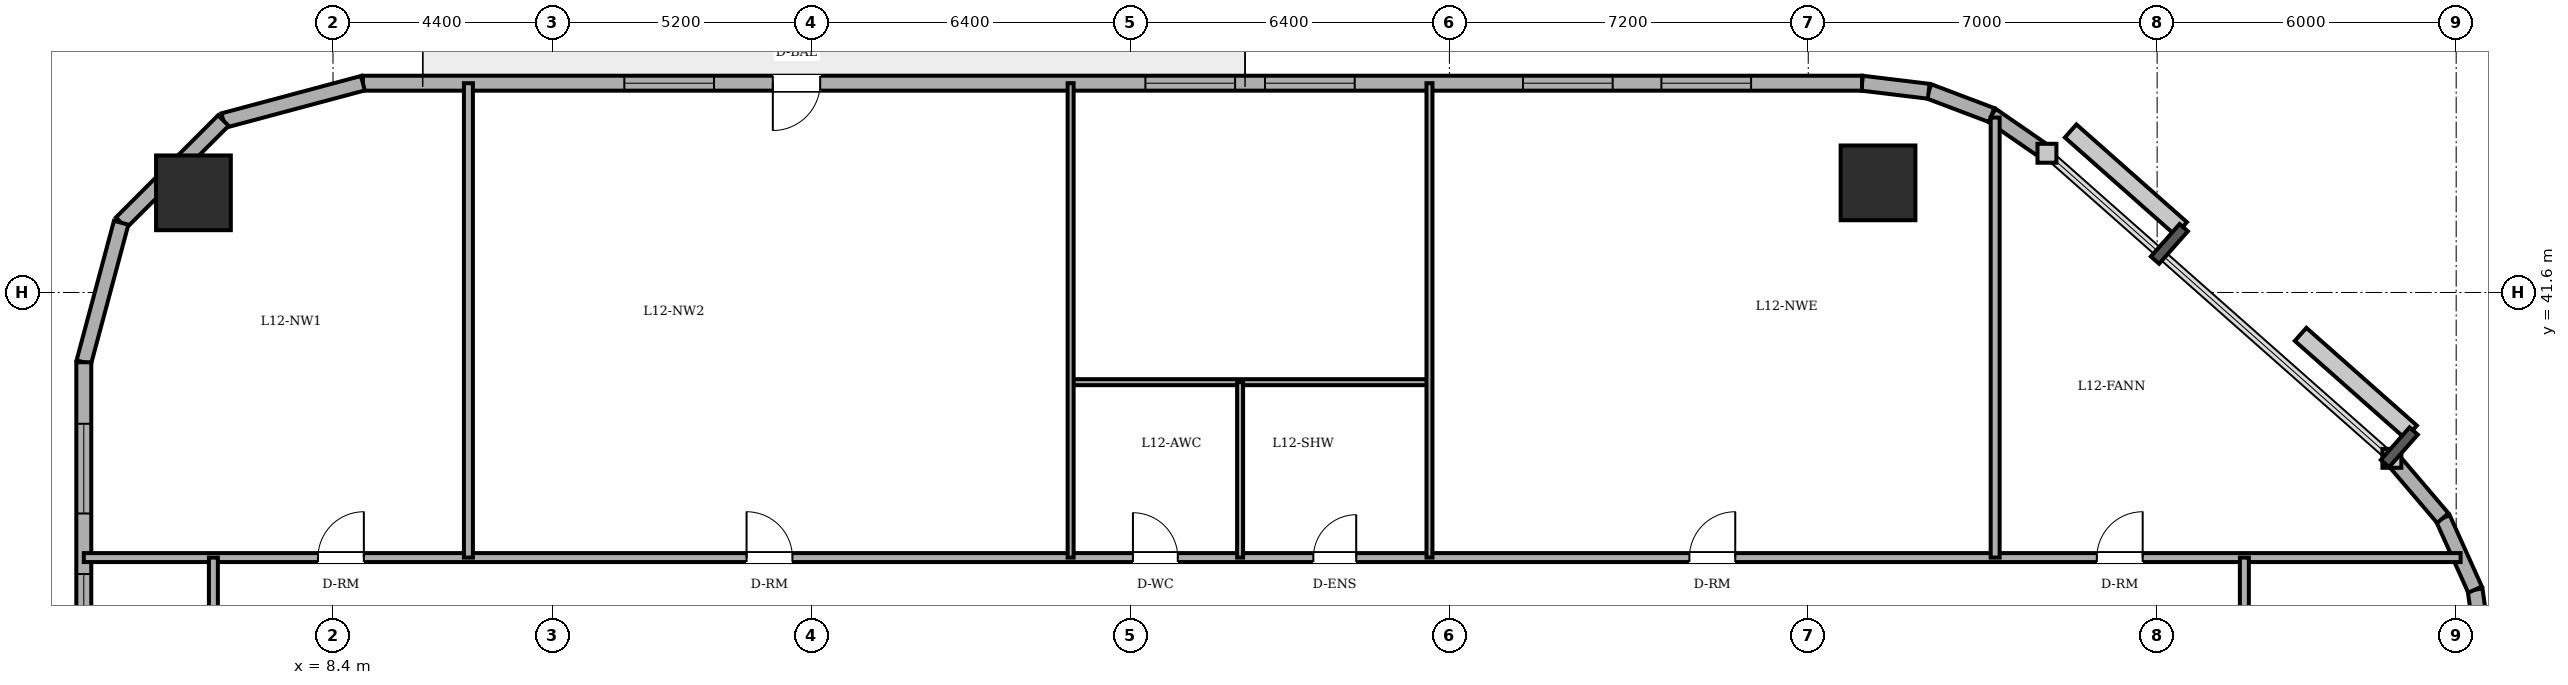
"""IFC4 building model, lengths in metres.
Left out: names, types, materials, properties, quantities, classifications, styles, units other than length and angle.
Written with IfcOpenShell. Run it as: python <this file> out.ifc"""

import sys

from ifc_helpers import new_model, si_unit, direction, frame, frame_2d, origin, origin_2d, place, context, subcontext, project, spatial, rectangle, circle, extrude, element, fill, save


model = new_model("IFC4")
c1 = context("Model", 3, precision=1e-05, world=origin(), true_north=direction((0.0, 1.0)))
c2 = subcontext(c1, "Body", "Model", "MODEL_VIEW")
j1 = project(units=[si_unit("LENGTHUNIT", "METRE"), si_unit("PLANEANGLEUNIT", "RADIAN")], contexts=[c1])
p1 = place(None, origin())
s1 = spatial("IfcSite", under=j1, at=p1, CompositionType="ELEMENT")
p2 = place(p1, origin())
s2 = spatial("IfcBuilding", under=s1, at=p2, CompositionType="ELEMENT")
p3 = place(p2, frame((0.0, 0.0, 46.8)))
s3 = spatial("IfcBuildingStorey", under=s2, at=p3, CompositionType="ELEMENT", Elevation=46.8)
for number, where, z_axis, x_axis in (
    (1, (39.4, 43.8, 0.0), (0.0, 0.0, 1.0), (1.0, 0.0, 0.0)),
    (2, (5.6, 43.6, 0.0), (0.0, 0.0, 1.0), (1.0, 0.0, 0.0)),
):
    element("IfcColumn", number, at=place(p3, frame(where, z_axis=z_axis, x_axis=x_axis)), inside=s3, PredefinedType="COLUMN", context=c2, shape_type="SweptSolid", body=[
        extrude(circle(Radius=0.75, at=origin_2d()), origin(), (0.0, 0.0, 1.0), 3.6),
    ])
p4 = place(p3, frame((51.6, 34.077, 0.0), z_axis=(0.0, 0.0, 1.0), x_axis=(-0.140380048512, 0.990097693149, 0.0)))
e3 = element("IfcWall", 3, at=p4, inside=s3, PredefinedType="SOLIDWALL", context=c2, shape_type="SweptSolid", body=[
    extrude(rectangle(XDim=1.576, YDim=0.3, at=frame_2d((0.788, 0.0))), origin(), (0.0, 0.0, 1.0), 3.4),
])
p5 = place(p3, frame((51.379, 35.637, 0.0), z_axis=(0.0, 0.0, 1.0), x_axis=(-0.410996558744, 0.911636895206, 0.0)))
e4 = element("IfcWall", 4, at=p5, inside=s3, PredefinedType="SOLIDWALL", context=c2, shape_type="SweptSolid", body=[
    extrude(rectangle(XDim=1.574, YDim=0.3, at=frame_2d((0.787, 0.0))), origin(), (0.0, 0.0, 1.0), 3.4),
])
p6 = place(p3, frame((50.732, 37.072, 0.0), z_axis=(0.0, 0.0, 1.0), x_axis=(-0.648389989909, 0.7613083613, 0.0)))
e5 = element("IfcWall", 5, at=p6, inside=s3, PredefinedType="SOLIDWALL", context=c2, shape_type="SweptSolid", body=[
    extrude(rectangle(XDim=1.576, YDim=0.3, at=frame_2d((0.788, 0.0))), origin(), (0.0, 0.0, 1.0), 3.4),
])
p7 = place(p3, frame((42.789, 44.394, 0.0), z_axis=(0.0, 0.0, 1.0), x_axis=(-0.823116500192, 0.567872544777, 0.0)))
e6 = element("IfcWall", 6, at=p7, inside=s3, PredefinedType="SOLIDWALL", context=c2, shape_type="SweptSolid", body=[
    extrude(rectangle(XDim=1.349, YDim=0.3, at=frame_2d((0.674, 0.0))), origin(), (0.0, 0.0, 1.0), 3.4),
])
p8 = place(p3, frame((41.679, 45.16, 0.0), z_axis=(0.0, 0.0, 1.0), x_axis=(-0.935156721165, 0.354234254216, 0.0)))
e7 = element("IfcWall", 7, at=p8, inside=s3, PredefinedType="SOLIDWALL", context=c2, shape_type="SweptSolid", body=[
    extrude(rectangle(XDim=1.349, YDim=0.3, at=frame_2d((0.675, 0.0))), origin(), (0.0, 0.0, 1.0), 3.4),
])
p9 = place(p3, frame((40.417, 45.638, 0.0), z_axis=(0.0, 0.0, 1.0), x_axis=(-0.992739027259, 0.120288086515, 0.0)))
e8 = element("IfcWall", 8, at=p9, inside=s3, PredefinedType="SOLIDWALL", context=c2, shape_type="SweptSolid", body=[
    extrude(rectangle(XDim=1.348, YDim=0.3, at=frame_2d((0.674, 0.0))), origin(), (0.0, 0.0, 1.0), 3.4),
])
p10 = place(p3, frame((39.079, 45.8, 0.0), z_axis=(0.0, 0.0, 1.0), x_axis=(-1.0, 0.0, 0.0)))
e9 = element("IfcWall", 9, at=p10, inside=s3, PredefinedType="SOLIDWALL", context=c2, shape_type="SweptSolid", body=[
    extrude(rectangle(XDim=30.079, YDim=0.3, at=frame_2d((15.04, 0.0))), origin(), (0.0, 0.0, 1.0), 3.4),
])
p11 = place(p10, frame((20.904, 0.0, 0.0)))
e10 = element("IfcOpeningElement", 10, at=p11, cuts=e9, PredefinedType="OPENING", context=c2, shape_type="SweptSolid", body=[
    extrude(rectangle(XDim=0.95, YDim=2.2, at=frame_2d((0.475, 1.1))), frame((0.0, 0.16, 0.0), z_axis=(0.0, -1.0, 0.0), x_axis=(1.0, 0.0, 0.0)), (0.0, 0.0, 1.0), 0.32),
])
p12 = place(p10, frame((2.226, 0.0, 0.85)))
e11 = element("IfcOpeningElement", 11, at=p12, cuts=e9, PredefinedType="OPENING", context=c2, shape_type="SweptSolid", body=[
    extrude(rectangle(XDim=1.8, YDim=1.55, at=frame_2d((0.9, 0.775))), frame((0.0, 0.16, 0.0), z_axis=(0.0, -1.0, 0.0), x_axis=(1.0, 0.0, 0.0)), (0.0, 0.0, 1.0), 0.32),
])
p13 = place(p10, frame((5.003, 0.0, 0.85)))
e12 = element("IfcOpeningElement", 12, at=p13, cuts=e9, PredefinedType="OPENING", context=c2, shape_type="SweptSolid", body=[
    extrude(rectangle(XDim=1.8, YDim=1.55, at=frame_2d((0.9, 0.775))), frame((0.0, 0.16, 0.0), z_axis=(0.0, -1.0, 0.0), x_axis=(1.0, 0.0, 0.0)), (0.0, 0.0, 1.0), 0.32),
])
p14 = place(p10, frame((10.179, 0.0, 0.85)))
e13 = element("IfcOpeningElement", 13, at=p14, cuts=e9, PredefinedType="OPENING", context=c2, shape_type="SweptSolid", body=[
    extrude(rectangle(XDim=1.8, YDim=1.55, at=frame_2d((0.9, 0.775))), frame((0.0, 0.16, 0.0), z_axis=(0.0, -1.0, 0.0), x_axis=(1.0, 0.0, 0.0)), (0.0, 0.0, 1.0), 0.32),
])
p15 = place(p10, frame((12.579, 0.0, 0.85)))
e14 = element("IfcOpeningElement", 14, at=p15, cuts=e9, PredefinedType="OPENING", context=c2, shape_type="SweptSolid", body=[
    extrude(rectangle(XDim=1.8, YDim=1.55, at=frame_2d((0.9, 0.775))), frame((0.0, 0.16, 0.0), z_axis=(0.0, -1.0, 0.0), x_axis=(1.0, 0.0, 0.0)), (0.0, 0.0, 1.0), 0.32),
])
p16 = place(p10, frame((23.034, 0.0, 0.85)))
e15 = element("IfcOpeningElement", 15, at=p16, cuts=e9, PredefinedType="OPENING", context=c2, shape_type="SweptSolid", body=[
    extrude(rectangle(XDim=1.8, YDim=1.55, at=frame_2d((0.9, 0.775))), frame((0.0, 0.16, 0.0), z_axis=(0.0, -1.0, 0.0), x_axis=(1.0, 0.0, 0.0)), (0.0, 0.0, 1.0), 0.32),
])
p17 = place(p3, frame((9.0, 45.8, 0.0), z_axis=(0.0, 0.0, 1.0), x_axis=(-0.96594917914, -0.258731875344, 0.0)))
e16 = element("IfcWall", 16, at=p17, inside=s3, PredefinedType="SOLIDWALL", context=c2, shape_type="SweptSolid", body=[
    extrude(rectangle(XDim=2.899, YDim=0.3, at=frame_2d((1.449, 0.0))), origin(), (0.0, 0.0, 1.0), 3.4),
])
p18 = place(p3, frame((6.2, 45.05, 0.0), z_axis=(0.0, 0.0, 1.0), x_axis=(-0.707106781187, -0.707106781187, 0.0)))
e17 = element("IfcWall", 17, at=p18, inside=s3, PredefinedType="SOLIDWALL", context=c2, shape_type="SweptSolid", body=[
    extrude(rectangle(XDim=2.899, YDim=0.3, at=frame_2d((1.45, 0.0))), origin(), (0.0, 0.0, 1.0), 3.4),
])
p19 = place(p3, frame((4.15, 43.0, 0.0), z_axis=(0.0, 0.0, 1.0), x_axis=(-0.258731875344, -0.96594917914, 0.0)))
e18 = element("IfcWall", 18, at=p19, inside=s3, PredefinedType="SOLIDWALL", context=c2, shape_type="SweptSolid", body=[
    extrude(rectangle(XDim=2.899, YDim=0.3, at=frame_2d((1.449, 0.0))), origin(), (0.0, 0.0, 1.0), 3.4),
])
p20 = place(p3, frame((3.4, 40.2, 0.0), z_axis=(0.0, 0.0, 1.0), x_axis=(0.0, -1.0, 0.0)))
e19 = element("IfcWall", 19, at=p20, inside=s3, PredefinedType="SOLIDWALL", context=c2, shape_type="SweptSolid", body=[
    extrude(rectangle(XDim=32.4, YDim=0.3, at=frame_2d((16.2, 0.0))), origin(), (0.0, 0.0, 1.0), 3.4),
])
p21 = place(p20, frame((1.235, 0.0, 0.85)))
e20 = element("IfcOpeningElement", 20, at=p21, cuts=e19, PredefinedType="OPENING", context=c2, shape_type="SweptSolid", body=[
    extrude(rectangle(XDim=1.8, YDim=1.55, at=frame_2d((0.9, 0.775))), frame((0.0, 0.16, 0.0), z_axis=(0.0, -1.0, 0.0), x_axis=(1.0, 0.0, 0.0)), (0.0, 0.0, 1.0), 0.32),
])
p22 = place(p20, frame((4.25, 0.0, 0.85)))
e21 = element("IfcOpeningElement", 21, at=p22, cuts=e19, PredefinedType="OPENING", context=c2, shape_type="SweptSolid", body=[
    extrude(rectangle(XDim=1.8, YDim=1.55, at=frame_2d((0.9, 0.775))), frame((0.0, 0.16, 0.0), z_axis=(0.0, -1.0, 0.0), x_axis=(1.0, 0.0, 0.0)), (0.0, 0.0, 1.0), 0.32),
])
p23 = place(p20, frame((9.253, 0.0, 0.85)))
e22 = element("IfcOpeningElement", 22, at=p23, cuts=e19, PredefinedType="OPENING", context=c2, shape_type="SweptSolid", body=[
    extrude(rectangle(XDim=1.8, YDim=1.55, at=frame_2d((0.9, 0.775))), frame((0.0, 0.16, 0.0), z_axis=(0.0, -1.0, 0.0), x_axis=(1.0, 0.0, 0.0)), (0.0, 0.0, 1.0), 0.32),
])
p24 = place(p20, frame((13.027, 0.0, 0.85)))
e23 = element("IfcOpeningElement", 23, at=p24, cuts=e19, PredefinedType="OPENING", context=c2, shape_type="SweptSolid", body=[
    extrude(rectangle(XDim=1.8, YDim=1.55, at=frame_2d((0.9, 0.775))), frame((0.0, 0.16, 0.0), z_axis=(0.0, -1.0, 0.0), x_axis=(1.0, 0.0, 0.0)), (0.0, 0.0, 1.0), 0.32),
])
p25 = place(p20, frame((19.573, 0.0, 0.85)))
e24 = element("IfcOpeningElement", 24, at=p25, cuts=e19, PredefinedType="OPENING", context=c2, shape_type="SweptSolid", body=[
    extrude(rectangle(XDim=1.8, YDim=1.55, at=frame_2d((0.9, 0.775))), frame((0.0, 0.16, 0.0), z_axis=(0.0, -1.0, 0.0), x_axis=(1.0, 0.0, 0.0)), (0.0, 0.0, 1.0), 0.32),
])
p26 = place(p20, frame((22.347, 0.0, 0.85)))
e25 = element("IfcOpeningElement", 25, at=p26, cuts=e19, PredefinedType="OPENING", context=c2, shape_type="SweptSolid", body=[
    extrude(rectangle(XDim=1.8, YDim=1.55, at=frame_2d((0.9, 0.775))), frame((0.0, 0.16, 0.0), z_axis=(0.0, -1.0, 0.0), x_axis=(1.0, 0.0, 0.0)), (0.0, 0.0, 1.0), 0.32),
])
p27 = place(p20, frame((26.35, 0.0, 0.85)))
e26 = element("IfcOpeningElement", 26, at=p27, cuts=e19, PredefinedType="OPENING", context=c2, shape_type="SweptSolid", body=[
    extrude(rectangle(XDim=1.8, YDim=1.55, at=frame_2d((0.9, 0.775))), frame((0.0, 0.16, 0.0), z_axis=(0.0, -1.0, 0.0), x_axis=(1.0, 0.0, 0.0)), (0.0, 0.0, 1.0), 0.32),
])
p28 = place(p20, frame((29.365, 0.0, 0.85)))
e27 = element("IfcOpeningElement", 27, at=p28, cuts=e19, PredefinedType="OPENING", context=c2, shape_type="SweptSolid", body=[
    extrude(rectangle(XDim=1.8, YDim=1.55, at=frame_2d((0.9, 0.775))), frame((0.0, 0.16, 0.0), z_axis=(0.0, -1.0, 0.0), x_axis=(1.0, 0.0, 0.0)), (0.0, 0.0, 1.0), 0.32),
])
p29 = place(p3, frame((3.4, 36.28, 0.0), z_axis=(0.0, 0.0, 1.0), x_axis=(1.0, 0.0, 0.0)))
e28 = element("IfcWall", 28, at=p29, inside=s3, PredefinedType="PARTITIONING", context=c2, shape_type="SweptSolid", body=[
    extrude(rectangle(XDim=47.689, YDim=0.18, at=frame_2d((23.845, 0.0))), origin(), (0.0, 0.0, 1.0), 3.4),
])
p30 = place(p29, frame((21.05, 0.0, 0.0)))
e29 = element("IfcOpeningElement", 29, at=p30, cuts=e28, PredefinedType="OPENING", context=c2, shape_type="SweptSolid", body=[
    extrude(rectangle(XDim=0.9, YDim=2.1, at=frame_2d((0.45, 1.05))), frame((0.0, 0.1, 0.0), z_axis=(0.0, -1.0, 0.0), x_axis=(1.0, 0.0, 0.0)), (0.0, 0.0, 1.0), 0.2),
])
p31 = place(p29, frame((24.67, 0.0, 0.0)))
e30 = element("IfcOpeningElement", 30, at=p31, cuts=e28, PredefinedType="OPENING", context=c2, shape_type="SweptSolid", body=[
    extrude(rectangle(XDim=0.86, YDim=2.1, at=frame_2d((0.43, 1.05))), frame((0.0, 0.1, 0.0), z_axis=(0.0, -1.0, 0.0), x_axis=(1.0, 0.0, 0.0)), (0.0, 0.0, 1.0), 0.2),
])
p32 = place(p29, frame((40.39, 0.0, 0.0)))
e31 = element("IfcOpeningElement", 31, at=p32, cuts=e28, PredefinedType="OPENING", context=c2, shape_type="SweptSolid", body=[
    extrude(rectangle(XDim=0.92, YDim=2.1, at=frame_2d((0.46, 1.05))), frame((0.0, 0.1, 0.0), z_axis=(0.0, -1.0, 0.0), x_axis=(1.0, 0.0, 0.0)), (0.0, 0.0, 1.0), 0.2),
])
p33 = place(p29, frame((4.699, 0.0, 0.0)))
e32 = element("IfcOpeningElement", 32, at=p33, cuts=e28, PredefinedType="OPENING", context=c2, shape_type="SweptSolid", body=[
    extrude(rectangle(XDim=0.92, YDim=2.1, at=frame_2d((0.46, 1.05))), frame((0.0, 0.1, 0.0), z_axis=(0.0, -1.0, 0.0), x_axis=(1.0, 0.0, 0.0)), (0.0, 0.0, 1.0), 0.2),
])
p34 = place(p29, frame((13.298, 0.0, 0.0)))
e33 = element("IfcOpeningElement", 33, at=p34, cuts=e28, PredefinedType="OPENING", context=c2, shape_type="SweptSolid", body=[
    extrude(rectangle(XDim=0.92, YDim=2.1, at=frame_2d((0.46, 1.05))), frame((0.0, 0.1, 0.0), z_axis=(0.0, -1.0, 0.0), x_axis=(1.0, 0.0, 0.0)), (0.0, 0.0, 1.0), 0.2),
])
p35 = place(p29, frame((32.215, 0.0, 0.0)))
e34 = element("IfcOpeningElement", 34, at=p35, cuts=e28, PredefinedType="OPENING", context=c2, shape_type="SweptSolid", body=[
    extrude(rectangle(XDim=0.92, YDim=2.1, at=frame_2d((0.46, 1.05))), frame((0.0, 0.1, 0.0), z_axis=(0.0, -1.0, 0.0), x_axis=(1.0, 0.0, 0.0)), (0.0, 0.0, 1.0), 0.2),
])
p36 = place(p3, frame((23.2, 39.8, 0.0), z_axis=(0.0, 0.0, 1.0), x_axis=(1.0, 0.0, 0.0)))
e35 = element("IfcWall", 35, at=p36, inside=s3, PredefinedType="PARTITIONING", context=c2, shape_type="SweptSolid", body=[
    extrude(rectangle(XDim=7.2, YDim=0.12, at=frame_2d((3.6, 0.0))), origin(), (0.0, 0.0, 1.0), 3.4),
])
p37 = place(p3, frame((6.0, 33.82, 0.0), z_axis=(0.0, 0.0, 1.0), x_axis=(0.0, 1.0, 0.0)))
e36 = element("IfcWall", 36, at=p37, inside=s3, PredefinedType="PARTITIONING", context=c2, shape_type="SweptSolid", body=[
    extrude(rectangle(XDim=2.46, YDim=0.18, at=frame_2d((1.23, 0.0))), origin(), (0.0, 0.0, 1.0), 3.4),
])
p38 = place(p3, frame((11.117, 36.28, 0.0), z_axis=(0.0, 0.0, 1.0), x_axis=(0.0, 1.0, 0.0)))
e37 = element("IfcWall", 37, at=p38, inside=s3, PredefinedType="PARTITIONING", context=c2, shape_type="SweptSolid", body=[
    extrude(rectangle(XDim=9.52, YDim=0.18, at=frame_2d((4.76, 0.0))), origin(), (0.0, 0.0, 1.0), 3.4),
])
p39 = place(p3, frame((23.2, 36.28, 0.0), z_axis=(0.0, 0.0, 1.0), x_axis=(0.0, 1.0, 0.0)))
e38 = element("IfcWall", 38, at=p39, inside=s3, PredefinedType="PARTITIONING", context=c2, shape_type="SweptSolid", body=[
    extrude(rectangle(XDim=9.52, YDim=0.12, at=frame_2d((4.76, 0.0))), origin(), (0.0, 0.0, 1.0), 3.4),
])
p40 = place(p3, frame((26.6, 36.28, 0.0), z_axis=(0.0, 0.0, 1.0), x_axis=(0.0, 1.0, 0.0)))
e39 = element("IfcWall", 39, at=p40, inside=s3, PredefinedType="PARTITIONING", context=c2, shape_type="SweptSolid", body=[
    extrude(rectangle(XDim=3.52, YDim=0.12, at=frame_2d((1.76, 0.0))), origin(), (0.0, 0.0, 1.0), 3.4),
])
p41 = place(p3, frame((30.4, 36.28, 0.0), z_axis=(0.0, 0.0, 1.0), x_axis=(0.0, 1.0, 0.0)))
e40 = element("IfcWall", 40, at=p41, inside=s3, PredefinedType="PARTITIONING", context=c2, shape_type="SweptSolid", body=[
    extrude(rectangle(XDim=9.52, YDim=0.12, at=frame_2d((4.76, 0.0))), origin(), (0.0, 0.0, 1.0), 3.4),
])
p42 = place(p3, frame((41.75, 36.28, 0.0), z_axis=(0.0, 0.0, 1.0), x_axis=(0.0, 1.0, 0.0)))
e41 = element("IfcWall", 41, at=p42, inside=s3, PredefinedType="PARTITIONING", context=c2, shape_type="SweptSolid", body=[
    extrude(rectangle(XDim=8.831, YDim=0.18, at=frame_2d((4.416, 0.0))), origin(), (0.0, 0.0, 1.0), 2.782),
])
p43 = place(p3, frame((46.75, 33.82, 0.0), z_axis=(0.0, 0.0, 1.0), x_axis=(0.0, 1.0, 0.0)))
e42 = element("IfcWall", 42, at=p43, inside=s3, PredefinedType="PARTITIONING", context=c2, shape_type="SweptSolid", body=[
    extrude(rectangle(XDim=2.46, YDim=0.18, at=frame_2d((1.23, 0.0))), origin(), (0.0, 0.0, 1.0), 3.4),
])
p44 = place(p11, origin())
e43 = element("IfcDoor", 43, at=p44, inside=s3, OperationType="SINGLE_SWING_RIGHT", PredefinedType="DOOR", context=c2, shape_type="SweptSolid", body=[
    extrude(rectangle(XDim=0.95, YDim=2.2, at=frame_2d((0.475, 1.1))), frame((0.0, 0.025, 0.0), z_axis=(0.0, -1.0, 0.0), x_axis=(1.0, 0.0, 0.0)), (0.0, 0.0, 1.0), 0.05),
])
fill(e10, e43)
p45 = place(p12, origin())
e44 = element("IfcWindow", 44, at=p45, inside=s3, PartitioningType="DOUBLE_PANEL_VERTICAL", PredefinedType="WINDOW", context=c2, shape_type="SweptSolid", body=[
    extrude(rectangle(XDim=1.8, YDim=1.55, at=frame_2d((0.9, 0.775))), frame((0.0, 0.03, 0.0), z_axis=(0.0, -1.0, 0.0), x_axis=(1.0, 0.0, 0.0)), (0.0, 0.0, 1.0), 0.06),
])
fill(e11, e44)
p46 = place(p13, origin())
e45 = element("IfcWindow", 45, at=p46, inside=s3, PartitioningType="DOUBLE_PANEL_VERTICAL", PredefinedType="WINDOW", context=c2, shape_type="SweptSolid", body=[
    extrude(rectangle(XDim=1.8, YDim=1.55, at=frame_2d((0.9, 0.775))), frame((0.0, 0.03, 0.0), z_axis=(0.0, -1.0, 0.0), x_axis=(1.0, 0.0, 0.0)), (0.0, 0.0, 1.0), 0.06),
])
fill(e12, e45)
p47 = place(p14, origin())
e46 = element("IfcWindow", 46, at=p47, inside=s3, PartitioningType="DOUBLE_PANEL_VERTICAL", PredefinedType="WINDOW", context=c2, shape_type="SweptSolid", body=[
    extrude(rectangle(XDim=1.8, YDim=1.55, at=frame_2d((0.9, 0.775))), frame((0.0, 0.03, 0.0), z_axis=(0.0, -1.0, 0.0), x_axis=(1.0, 0.0, 0.0)), (0.0, 0.0, 1.0), 0.06),
])
fill(e13, e46)
p48 = place(p15, origin())
e47 = element("IfcWindow", 47, at=p48, inside=s3, PartitioningType="DOUBLE_PANEL_VERTICAL", PredefinedType="WINDOW", context=c2, shape_type="SweptSolid", body=[
    extrude(rectangle(XDim=1.8, YDim=1.55, at=frame_2d((0.9, 0.775))), frame((0.0, 0.03, 0.0), z_axis=(0.0, -1.0, 0.0), x_axis=(1.0, 0.0, 0.0)), (0.0, 0.0, 1.0), 0.06),
])
fill(e14, e47)
p49 = place(p16, origin())
e48 = element("IfcWindow", 48, at=p49, inside=s3, PartitioningType="DOUBLE_PANEL_VERTICAL", PredefinedType="WINDOW", context=c2, shape_type="SweptSolid", body=[
    extrude(rectangle(XDim=1.8, YDim=1.55, at=frame_2d((0.9, 0.775))), frame((0.0, 0.03, 0.0), z_axis=(0.0, -1.0, 0.0), x_axis=(1.0, 0.0, 0.0)), (0.0, 0.0, 1.0), 0.06),
])
fill(e15, e48)
p50 = place(p21, origin())
e49 = element("IfcWindow", 49, at=p50, inside=s3, PartitioningType="DOUBLE_PANEL_VERTICAL", PredefinedType="WINDOW", context=c2, shape_type="SweptSolid", body=[
    extrude(rectangle(XDim=1.8, YDim=1.55, at=frame_2d((0.9, 0.775))), frame((0.0, 0.03, 0.0), z_axis=(0.0, -1.0, 0.0), x_axis=(1.0, 0.0, 0.0)), (0.0, 0.0, 1.0), 0.06),
])
fill(e20, e49)
p51 = place(p22, origin())
e50 = element("IfcWindow", 50, at=p51, inside=s3, PartitioningType="DOUBLE_PANEL_VERTICAL", PredefinedType="WINDOW", context=c2, shape_type="SweptSolid", body=[
    extrude(rectangle(XDim=1.8, YDim=1.55, at=frame_2d((0.9, 0.775))), frame((0.0, 0.03, 0.0), z_axis=(0.0, -1.0, 0.0), x_axis=(1.0, 0.0, 0.0)), (0.0, 0.0, 1.0), 0.06),
])
fill(e21, e50)
p52 = place(p30, origin())
e51 = element("IfcDoor", 51, at=p52, inside=s3, OperationType="SINGLE_SWING_LEFT", PredefinedType="DOOR", context=c2, shape_type="SweptSolid", body=[
    extrude(rectangle(XDim=0.9, YDim=2.1, at=frame_2d((0.45, 1.05))), frame((0.0, 0.025, 0.0), z_axis=(0.0, -1.0, 0.0), x_axis=(1.0, 0.0, 0.0)), (0.0, 0.0, 1.0), 0.05),
])
fill(e29, e51)
p53 = place(p31, origin())
e52 = element("IfcDoor", 52, at=p53, inside=s3, OperationType="SINGLE_SWING_RIGHT", PredefinedType="DOOR", context=c2, shape_type="SweptSolid", body=[
    extrude(rectangle(XDim=0.86, YDim=2.1, at=frame_2d((0.43, 1.05))), frame((0.0, 0.025, 0.0), z_axis=(0.0, -1.0, 0.0), x_axis=(1.0, 0.0, 0.0)), (0.0, 0.0, 1.0), 0.05),
])
fill(e30, e52)
p54 = place(p32, origin())
e53 = element("IfcDoor", 53, at=p54, inside=s3, OperationType="SINGLE_SWING_RIGHT", PredefinedType="DOOR", context=c2, shape_type="SweptSolid", body=[
    extrude(rectangle(XDim=0.92, YDim=2.1, at=frame_2d((0.46, 1.05))), frame((0.0, 0.025, 0.0), z_axis=(0.0, -1.0, 0.0), x_axis=(1.0, 0.0, 0.0)), (0.0, 0.0, 1.0), 0.05),
])
fill(e31, e53)
p55 = place(p33, origin())
e54 = element("IfcDoor", 54, at=p55, inside=s3, OperationType="SINGLE_SWING_RIGHT", PredefinedType="DOOR", context=c2, shape_type="SweptSolid", body=[
    extrude(rectangle(XDim=0.92, YDim=2.1, at=frame_2d((0.46, 1.05))), frame((0.0, 0.025, 0.0), z_axis=(0.0, -1.0, 0.0), x_axis=(1.0, 0.0, 0.0)), (0.0, 0.0, 1.0), 0.05),
])
fill(e32, e54)
p56 = place(p34, origin())
e55 = element("IfcDoor", 55, at=p56, inside=s3, OperationType="SINGLE_SWING_LEFT", PredefinedType="DOOR", context=c2, shape_type="SweptSolid", body=[
    extrude(rectangle(XDim=0.92, YDim=2.1, at=frame_2d((0.46, 1.05))), frame((0.0, 0.025, 0.0), z_axis=(0.0, -1.0, 0.0), x_axis=(1.0, 0.0, 0.0)), (0.0, 0.0, 1.0), 0.05),
])
fill(e33, e55)
p57 = place(p35, origin())
e56 = element("IfcDoor", 56, at=p57, inside=s3, OperationType="SINGLE_SWING_RIGHT", PredefinedType="DOOR", context=c2, shape_type="SweptSolid", body=[
    extrude(rectangle(XDim=0.92, YDim=2.1, at=frame_2d((0.46, 1.05))), frame((0.0, 0.025, 0.0), z_axis=(0.0, -1.0, 0.0), x_axis=(1.0, 0.0, 0.0)), (0.0, 0.0, 1.0), 0.05),
])
fill(e34, e56)
save(model, sys.argv[1])
